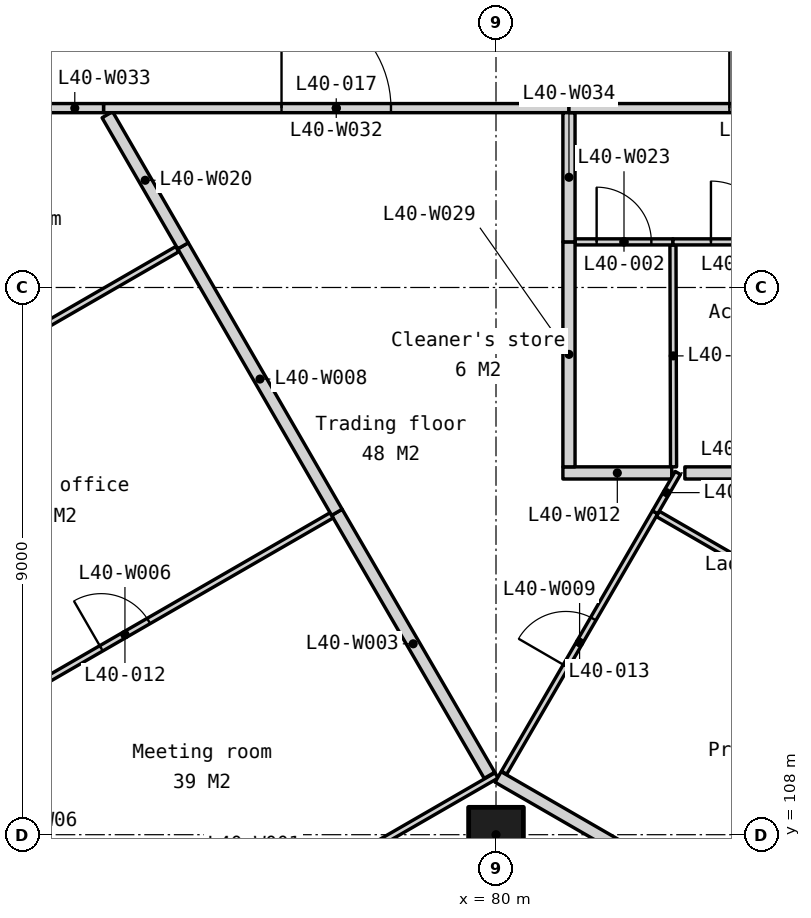
"""IFC4 building model, lengths in metres.
Left out: names, types, materials, properties, quantities, classifications, styles, units other than length and angle.
Written with IfcOpenShell. Run it as: python <this file> out.ifc"""

import sys

from ifc_helpers import new_model, si_unit, direction, frame, frame_2d, origin, origin_2d, place, context, subcontext, project, spatial, polyline, rectangle, outline, extrude, element, fill, save


model = new_model("IFC4")
c1 = context("Model", 3, precision=1e-05, world=origin(), true_north=direction((0.0, 1.0)))
c2 = subcontext(c1, "Body", "Model", "MODEL_VIEW")
j1 = project(units=[si_unit("LENGTHUNIT", "METRE"), si_unit("PLANEANGLEUNIT", "RADIAN")], contexts=[c1])
p1 = place(None, origin())
s1 = spatial("IfcSite", under=j1, at=p1, CompositionType="ELEMENT")
p2 = place(p1, origin())
s2 = spatial("IfcBuilding", under=s1, at=p2, CompositionType="ELEMENT")
p3 = place(p2, frame((0.0, 0.0, 159.8)))
s3 = spatial("IfcBuildingStorey", under=s2, at=p3, CompositionType="ELEMENT", Elevation=159.8)
p4 = place(p3, frame((80.0, 108.0, 0.0), z_axis=(0.0, 0.0, 1.0), x_axis=(1.0, 0.0, 0.0)))
e1 = element("IfcColumn", 1, at=p4, inside=s3, PredefinedType="COLUMN", context=c2, shape_type="SweptSolid", body=[
    extrude(rectangle(XDim=0.9, YDim=0.9, at=origin_2d()), origin(), (0.0, 0.0, 1.0), 3.9),
])
p5 = place(p3, frame((57.652, 131.129, -0.15), z_axis=(0.0, 0.0, 1.0), x_axis=(0.499997369791, -0.866026922331, 0.0)))
e2 = element("IfcWall", 2, at=p5, inside=s3, PredefinedType="SOLIDWALL", context=c2, shape_type="SweptSolid", body=[
    extrude(outline(polyline([(40.486, 0.0), (40.486, 3.9), (0.0, 3.9), (0.0, 0.0), (40.486, 0.0)])), frame((0.0, 0.225, 0.0), z_axis=(0.0, -1.0, 0.0), x_axis=(1.0, 0.0, 0.0)), (0.0, 0.0, 1.0), 0.45),
])
p6 = place(p5, frame((3.011, 0.0, 0.95)))
e3 = element("IfcOpeningElement", 3, at=p6, cuts=e2, PredefinedType="OPENING", context=c2, shape_type="SweptSolid", body=[
    extrude(rectangle(XDim=1.8, YDim=2.2, at=frame_2d((0.9, 1.1))), frame((0.0, 0.235, 0.0), z_axis=(0.0, -1.0, 0.0), x_axis=(1.0, 0.0, 0.0)), (0.0, 0.0, 1.0), 0.47),
])
p7 = place(p5, frame((5.311, 0.0, 0.95)))
e4 = element("IfcOpeningElement", 4, at=p7, cuts=e2, PredefinedType="OPENING", context=c2, shape_type="SweptSolid", body=[
    extrude(rectangle(XDim=1.8, YDim=2.2, at=frame_2d((0.9, 1.1))), frame((0.0, 0.235, 0.0), z_axis=(0.0, -1.0, 0.0), x_axis=(1.0, 0.0, 0.0)), (0.0, 0.0, 1.0), 0.47),
])
p8 = place(p5, frame((13.132, 0.0, 0.95)))
e5 = element("IfcOpeningElement", 5, at=p8, cuts=e2, PredefinedType="OPENING", context=c2, shape_type="SweptSolid", body=[
    extrude(rectangle(XDim=1.8, YDim=2.2, at=frame_2d((0.9, 1.1))), frame((0.0, 0.235, 0.0), z_axis=(0.0, -1.0, 0.0), x_axis=(1.0, 0.0, 0.0)), (0.0, 0.0, 1.0), 0.47),
])
p9 = place(p5, frame((15.432, 0.0, 0.95)))
e6 = element("IfcOpeningElement", 6, at=p9, cuts=e2, PredefinedType="OPENING", context=c2, shape_type="SweptSolid", body=[
    extrude(rectangle(XDim=1.8, YDim=2.2, at=frame_2d((0.9, 1.1))), frame((0.0, 0.235, 0.0), z_axis=(0.0, -1.0, 0.0), x_axis=(1.0, 0.0, 0.0)), (0.0, 0.0, 1.0), 0.47),
])
p10 = place(p5, frame((23.254, 0.0, 0.95)))
e7 = element("IfcOpeningElement", 7, at=p10, cuts=e2, PredefinedType="OPENING", context=c2, shape_type="SweptSolid", body=[
    extrude(rectangle(XDim=1.8, YDim=2.2, at=frame_2d((0.9, 1.1))), frame((0.0, 0.235, 0.0), z_axis=(0.0, -1.0, 0.0), x_axis=(1.0, 0.0, 0.0)), (0.0, 0.0, 1.0), 0.47),
])
p11 = place(p5, frame((25.554, 0.0, 0.95)))
e8 = element("IfcOpeningElement", 8, at=p11, cuts=e2, PredefinedType="OPENING", context=c2, shape_type="SweptSolid", body=[
    extrude(rectangle(XDim=1.8, YDim=2.2, at=frame_2d((0.9, 1.1))), frame((0.0, 0.235, 0.0), z_axis=(0.0, -1.0, 0.0), x_axis=(1.0, 0.0, 0.0)), (0.0, 0.0, 1.0), 0.47),
])
p12 = place(p5, frame((33.375, 0.0, 0.95)))
e9 = element("IfcOpeningElement", 9, at=p12, cuts=e2, PredefinedType="OPENING", context=c2, shape_type="SweptSolid", body=[
    extrude(rectangle(XDim=1.8, YDim=2.2, at=frame_2d((0.9, 1.1))), frame((0.0, 0.235, 0.0), z_axis=(0.0, -1.0, 0.0), x_axis=(1.0, 0.0, 0.0)), (0.0, 0.0, 1.0), 0.47),
])
p13 = place(p5, frame((35.675, 0.0, 0.95)))
e10 = element("IfcOpeningElement", 10, at=p13, cuts=e2, PredefinedType="OPENING", context=c2, shape_type="SweptSolid", body=[
    extrude(rectangle(XDim=1.8, YDim=2.2, at=frame_2d((0.9, 1.1))), frame((0.0, 0.235, 0.0), z_axis=(0.0, -1.0, 0.0), x_axis=(1.0, 0.0, 0.0)), (0.0, 0.0, 1.0), 0.47),
])
p14 = place(p3, frame((82.105, 96.067, -0.15), z_axis=(0.0, 0.0, 1.0), x_axis=(0.499997369791, 0.866026922331, 0.0)))
e11 = element("IfcWall", 11, at=p14, inside=s3, PredefinedType="SOLIDWALL", context=c2, shape_type="SweptSolid", body=[
    extrude(outline(polyline([(40.486, 0.0), (40.486, 3.9), (0.0, 3.9), (0.0, 0.0), (40.486, 0.0)])), frame((0.0, 0.225, 0.0), z_axis=(0.0, -1.0, 0.0), x_axis=(1.0, 0.0, 0.0)), (0.0, 0.0, 1.0), 0.45),
])
p15 = place(p14, frame((3.011, 0.0, 0.95)))
e12 = element("IfcOpeningElement", 12, at=p15, cuts=e11, PredefinedType="OPENING", context=c2, shape_type="SweptSolid", body=[
    extrude(rectangle(XDim=1.8, YDim=2.2, at=frame_2d((0.9, 1.1))), frame((0.0, 0.235, 0.0), z_axis=(0.0, -1.0, 0.0), x_axis=(1.0, 0.0, 0.0)), (0.0, 0.0, 1.0), 0.47),
])
p16 = place(p14, frame((5.311, 0.0, 0.95)))
e13 = element("IfcOpeningElement", 13, at=p16, cuts=e11, PredefinedType="OPENING", context=c2, shape_type="SweptSolid", body=[
    extrude(rectangle(XDim=1.8, YDim=2.2, at=frame_2d((0.9, 1.1))), frame((0.0, 0.235, 0.0), z_axis=(0.0, -1.0, 0.0), x_axis=(1.0, 0.0, 0.0)), (0.0, 0.0, 1.0), 0.47),
])
p17 = place(p14, frame((13.132, 0.0, 0.95)))
e14 = element("IfcOpeningElement", 14, at=p17, cuts=e11, PredefinedType="OPENING", context=c2, shape_type="SweptSolid", body=[
    extrude(rectangle(XDim=1.8, YDim=2.2, at=frame_2d((0.9, 1.1))), frame((0.0, 0.235, 0.0), z_axis=(0.0, -1.0, 0.0), x_axis=(1.0, 0.0, 0.0)), (0.0, 0.0, 1.0), 0.47),
])
p18 = place(p14, frame((15.432, 0.0, 0.95)))
e15 = element("IfcOpeningElement", 15, at=p18, cuts=e11, PredefinedType="OPENING", context=c2, shape_type="SweptSolid", body=[
    extrude(rectangle(XDim=1.8, YDim=2.2, at=frame_2d((0.9, 1.1))), frame((0.0, 0.235, 0.0), z_axis=(0.0, -1.0, 0.0), x_axis=(1.0, 0.0, 0.0)), (0.0, 0.0, 1.0), 0.47),
])
p19 = place(p14, frame((23.254, 0.0, 0.95)))
e16 = element("IfcOpeningElement", 16, at=p19, cuts=e11, PredefinedType="OPENING", context=c2, shape_type="SweptSolid", body=[
    extrude(rectangle(XDim=1.8, YDim=2.2, at=frame_2d((0.9, 1.1))), frame((0.0, 0.235, 0.0), z_axis=(0.0, -1.0, 0.0), x_axis=(1.0, 0.0, 0.0)), (0.0, 0.0, 1.0), 0.47),
])
p20 = place(p14, frame((25.554, 0.0, 0.95)))
e17 = element("IfcOpeningElement", 17, at=p20, cuts=e11, PredefinedType="OPENING", context=c2, shape_type="SweptSolid", body=[
    extrude(rectangle(XDim=1.8, YDim=2.2, at=frame_2d((0.9, 1.1))), frame((0.0, 0.235, 0.0), z_axis=(0.0, -1.0, 0.0), x_axis=(1.0, 0.0, 0.0)), (0.0, 0.0, 1.0), 0.47),
])
p21 = place(p14, frame((33.375, 0.0, 0.95)))
e18 = element("IfcOpeningElement", 18, at=p21, cuts=e11, PredefinedType="OPENING", context=c2, shape_type="SweptSolid", body=[
    extrude(rectangle(XDim=1.8, YDim=2.2, at=frame_2d((0.9, 1.1))), frame((0.0, 0.235, 0.0), z_axis=(0.0, -1.0, 0.0), x_axis=(1.0, 0.0, 0.0)), (0.0, 0.0, 1.0), 0.47),
])
p22 = place(p14, frame((35.675, 0.0, 0.95)))
e19 = element("IfcOpeningElement", 19, at=p22, cuts=e11, PredefinedType="OPENING", context=c2, shape_type="SweptSolid", body=[
    extrude(rectangle(XDim=1.8, YDim=2.2, at=frame_2d((0.9, 1.1))), frame((0.0, 0.235, 0.0), z_axis=(0.0, -1.0, 0.0), x_axis=(1.0, 0.0, 0.0)), (0.0, 0.0, 1.0), 0.47),
])
p23 = place(p3, frame((73.029, 104.945, 0.0), z_axis=(0.0, 0.0, 1.0), x_axis=(0.866018113567, 0.500012626815, 0.0)))
e20 = element("IfcWall", 20, at=p23, inside=s3, PredefinedType="PARTITIONING", context=c2, shape_type="SweptSolid", body=[
    extrude(rectangle(XDim=8.06, YDim=0.1, at=frame_2d((4.03, 0.0))), origin(), (0.0, 0.0, 1.0), 3.75),
])
p24 = place(p23, frame((3.58, 0.0, 0.0)))
e21 = element("IfcOpeningElement", 21, at=p24, cuts=e20, PredefinedType="OPENING", context=c2, shape_type="SweptSolid", body=[
    extrude(rectangle(XDim=0.9, YDim=2.1, at=frame_2d((0.45, 1.05))), frame((0.0, 0.06, 0.0), z_axis=(0.0, -1.0, 0.0), x_axis=(1.0, 0.0, 0.0)), (0.0, 0.0, 1.0), 0.12),
])
p25 = place(p3, frame((77.384, 113.302, 0.0), z_axis=(0.0, 0.0, 1.0), x_axis=(0.501680827225, -0.865052800467, 0.0)))
e22 = element("IfcWall", 22, at=p25, inside=s3, PredefinedType="PARTITIONING", context=c2, shape_type="SweptSolid", body=[
    extrude(rectangle(XDim=5.001, YDim=0.2, at=frame_2d((2.5, 0.0))), origin(), (0.0, 0.0, 1.0), 3.75),
])
p26 = place(p3, frame((80.034, 108.95, 0.0), z_axis=(0.0, 0.0, 1.0), x_axis=(0.866028745538, -0.499994211868, 0.0)))
e23 = element("IfcWall", 23, at=p26, inside=s3, PredefinedType="PARTITIONING", context=c2, shape_type="SweptSolid", body=[
    extrude(rectangle(XDim=8.01, YDim=0.2, at=frame_2d((4.005, 0.0))), origin(), (0.0, 0.0, 1.0), 3.75),
])
p27 = place(p3, frame((70.499, 109.327, 0.0), z_axis=(0.0, 0.0, 1.0), x_axis=(0.86602399778, 0.500002435262, 0.0)))
e24 = element("IfcWall", 24, at=p27, inside=s3, PredefinedType="PARTITIONING", context=c2, shape_type="SweptSolid", body=[
    extrude(rectangle(XDim=7.85, YDim=0.1, at=frame_2d((3.925, 0.0))), origin(), (0.0, 0.0, 1.0), 3.75),
])
p28 = place(p27, frame((3.475, 0.0, 0.0)))
e25 = element("IfcOpeningElement", 25, at=p28, cuts=e24, PredefinedType="OPENING", context=c2, shape_type="SweptSolid", body=[
    extrude(rectangle(XDim=0.9, YDim=2.1, at=frame_2d((0.45, 1.05))), frame((0.0, 0.06, 0.0), z_axis=(0.0, -1.0, 0.0), x_axis=(1.0, 0.0, 0.0)), (0.0, 0.0, 1.0), 0.12),
])
p29 = place(p3, frame((82.66, 113.278, 0.0), z_axis=(0.0, 0.0, 1.0), x_axis=(0.866013180616, -0.500021170551, 0.0)))
e26 = element("IfcWall", 26, at=p29, inside=s3, PredefinedType="PARTITIONING", context=c2, shape_type="SweptSolid", body=[
    extrude(rectangle(XDim=7.9, YDim=0.1, at=frame_2d((3.95, 0.0))), origin(), (0.0, 0.0, 1.0), 3.75),
])
p30 = place(p29, frame((3.5, 0.0, 0.0)))
e27 = element("IfcOpeningElement", 27, at=p30, cuts=e26, PredefinedType="OPENING", context=c2, shape_type="SweptSolid", body=[
    extrude(rectangle(XDim=0.9, YDim=2.1, at=frame_2d((0.45, 1.05))), frame((0.0, 0.06, 0.0), z_axis=(0.0, -1.0, 0.0), x_axis=(1.0, 0.0, 0.0)), (0.0, 0.0, 1.0), 0.12),
])
p31 = place(p3, frame((74.853, 117.685, 0.0), z_axis=(0.0, 0.0, 1.0), x_axis=(0.500014760403, -0.866016881694, 0.0)))
e28 = element("IfcWall", 28, at=p31, inside=s3, PredefinedType="PARTITIONING", context=c2, shape_type="SweptSolid", body=[
    extrude(rectangle(XDim=5.061, YDim=0.2, at=frame_2d((2.53, 0.0))), origin(), (0.0, 0.0, 1.0), 3.75),
])
p32 = place(p3, frame((80.133, 109.02, 0.0), z_axis=(0.0, 0.0, 1.0), x_axis=(0.501726207978, 0.865026480651, 0.0)))
e29 = element("IfcWall", 29, at=p32, inside=s3, PredefinedType="PARTITIONING", context=c2, shape_type="SweptSolid", body=[
    extrude(rectangle(XDim=4.951, YDim=0.1, at=frame_2d((2.475, 0.0))), origin(), (0.0, 0.0, 1.0), 3.75),
])
p33 = place(p32, frame((2.025, 0.0, 0.0)))
e30 = element("IfcOpeningElement", 30, at=p33, cuts=e29, PredefinedType="OPENING", context=c2, shape_type="SweptSolid", body=[
    extrude(rectangle(XDim=0.9, YDim=2.1, at=frame_2d((0.45, 1.05))), frame((0.0, 0.06, 0.0), z_axis=(0.0, -1.0, 0.0), x_axis=(1.0, 0.0, 0.0)), (0.0, 0.0, 1.0), 0.12),
])
p34 = place(p3, frame((67.968, 113.71, 0.0), z_axis=(0.0, 0.0, 1.0), x_axis=(0.866013415921, 0.500020763015, 0.0)))
e31 = element("IfcWall", 31, at=p34, inside=s3, PredefinedType="PARTITIONING", context=c2, shape_type="SweptSolid", body=[
    extrude(rectangle(XDim=7.84, YDim=0.1, at=frame_2d((3.92, 0.0))), origin(), (0.0, 0.0, 1.0), 3.75),
])
p35 = place(p34, frame((3.47, 0.0, 0.0)))
e32 = element("IfcOpeningElement", 32, at=p35, cuts=e31, PredefinedType="OPENING", context=c2, shape_type="SweptSolid", body=[
    extrude(rectangle(XDim=0.9, YDim=2.1, at=frame_2d((0.45, 1.05))), frame((0.0, 0.06, 0.0), z_axis=(0.0, -1.0, 0.0), x_axis=(1.0, 0.0, 0.0)), (0.0, 0.0, 1.0), 0.12),
])
p36 = place(p3, frame((81.1, 113.95, 0.0), z_axis=(0.0, 0.0, 1.0), x_axis=(1.0, 0.0, 0.0)))
e33 = element("IfcWall", 33, at=p36, inside=s3, PredefinedType="PARTITIONING", context=c2, shape_type="SweptSolid", body=[
    extrude(rectangle(XDim=1.79, YDim=0.2, at=frame_2d((0.895, 0.0))), origin(), (0.0, 0.0, 1.0), 3.75),
])
p37 = place(p3, frame((82.616, 113.302, 0.0), z_axis=(0.0, 0.0, 1.0), x_axis=(0.500212318761, 0.865902786784, 0.0)))
e34 = element("IfcWall", 34, at=p37, inside=s3, PredefinedType="PARTITIONING", context=c2, shape_type="SweptSolid", body=[
    extrude(rectangle(XDim=0.748, YDim=0.1, at=frame_2d((0.374, 0.0))), origin(), (0.0, 0.0, 1.0), 3.75),
])
p38 = place(p3, frame((83.106, 113.95, 0.0), z_axis=(0.0, 0.0, 1.0), x_axis=(1.0, 0.0, 0.0)))
e35 = element("IfcWall", 35, at=p38, inside=s3, PredefinedType="PARTITIONING", context=c2, shape_type="SweptSolid", body=[
    extrude(rectangle(XDim=2.044, YDim=0.2, at=frame_2d((1.022, 0.0))), origin(), (0.0, 0.0, 1.0), 3.75),
])
p39 = place(p3, frame((73.608, 119.842, 0.0), z_axis=(0.0, 0.0, 1.0), x_axis=(0.50001949124, -0.86601415022, 0.0)))
e36 = element("IfcWall", 36, at=p39, inside=s3, PredefinedType="PARTITIONING", context=c2, shape_type="SweptSolid", body=[
    extrude(rectangle(XDim=2.49, YDim=0.2, at=frame_2d((1.245, 0.0))), origin(), (0.0, 0.0, 1.0), 3.75),
])
p40 = place(p3, frame((82.92, 114.05, 0.0), z_axis=(0.0, 0.0, 1.0), x_axis=(-0.002608686776, 0.999996597371, 0.0)))
e37 = element("IfcWall", 37, at=p40, inside=s3, PredefinedType="PARTITIONING", context=c2, shape_type="SweptSolid", body=[
    extrude(rectangle(XDim=3.65, YDim=0.1, at=frame_2d((1.825, 0.0))), origin(), (0.0, 0.0, 1.0), 3.75),
])
p41 = place(p3, frame((81.3, 117.75, 0.0), z_axis=(0.0, 0.0, 1.0), x_axis=(1.0, 0.0, 0.0)))
e38 = element("IfcWall", 38, at=p41, inside=s3, PredefinedType="PARTITIONING", context=c2, shape_type="SweptSolid", body=[
    extrude(rectangle(XDim=1.61, YDim=0.1, at=frame_2d((0.805, 0.0))), origin(), (0.0, 0.0, 1.0), 3.75),
])
p42 = place(p41, frame((0.355, 0.0, 0.0)))
e39 = element("IfcOpeningElement", 39, at=p42, cuts=e38, PredefinedType="OPENING", context=c2, shape_type="SweptSolid", body=[
    extrude(rectangle(XDim=0.9, YDim=2.1, at=frame_2d((0.45, 1.05))), frame((0.0, 0.06, 0.0), z_axis=(0.0, -1.0, 0.0), x_axis=(1.0, 0.0, 0.0)), (0.0, 0.0, 1.0), 0.12),
])
p43 = place(p3, frame((82.91, 117.75, 0.0), z_axis=(0.0, 0.0, 1.0), x_axis=(1.0, 0.0, 0.0)))
e40 = element("IfcWall", 40, at=p43, inside=s3, PredefinedType="PARTITIONING", context=c2, shape_type="SweptSolid", body=[
    extrude(rectangle(XDim=2.25, YDim=0.1, at=frame_2d((1.125, 0.0))), origin(), (0.0, 0.0, 1.0), 3.75),
])
p44 = place(p43, frame((0.625, 0.0, 0.0)))
e41 = element("IfcOpeningElement", 41, at=p44, cuts=e40, PredefinedType="OPENING", context=c2, shape_type="SweptSolid", body=[
    extrude(rectangle(XDim=1.0, YDim=2.1, at=frame_2d((0.5, 1.05))), frame((0.0, 0.06, 0.0), z_axis=(0.0, -1.0, 0.0), x_axis=(1.0, 0.0, 0.0)), (0.0, 0.0, 1.0), 0.12),
])
p45 = place(p3, frame((81.2, 114.05, 0.0), z_axis=(0.0, 0.0, 1.0), x_axis=(0.0, 1.0, 0.0)))
e42 = element("IfcWall", 42, at=p45, inside=s3, PredefinedType="PARTITIONING", context=c2, shape_type="SweptSolid", body=[
    extrude(rectangle(XDim=3.7, YDim=0.2, at=frame_2d((1.85, 0.0))), origin(), (0.0, 0.0, 1.0), 3.75),
])
p46 = place(p3, frame((73.545, 119.95, 0.0), z_axis=(0.0, 0.0, 1.0), x_axis=(1.0, 0.0, 0.0)))
e43 = element("IfcWall", 43, at=p46, inside=s3, PredefinedType="PARTITIONING", context=c2, shape_type="SweptSolid", body=[
    extrude(rectangle(XDim=7.655, YDim=0.15, at=frame_2d((3.827, 0.0))), origin(), (0.0, 0.0, 1.0), 3.75),
])
p47 = place(p46, frame((2.927, 0.0, 0.0)))
e44 = element("IfcOpeningElement", 44, at=p47, cuts=e43, PredefinedType="OPENING", context=c2, shape_type="SweptSolid", body=[
    extrude(rectangle(XDim=1.8, YDim=2.1, at=frame_2d((0.9, 1.05))), frame((0.0, 0.085, 0.0), z_axis=(0.0, -1.0, 0.0), x_axis=(1.0, 0.0, 0.0)), (0.0, 0.0, 1.0), 0.17),
])
p48 = place(p3, frame((72.6, 119.95, 0.0), z_axis=(0.0, 0.0, 1.0), x_axis=(1.0, 0.0, 0.0)))
e45 = element("IfcWall", 45, at=p48, inside=s3, PredefinedType="PARTITIONING", context=c2, shape_type="SweptSolid", body=[
    extrude(rectangle(XDim=0.945, YDim=0.15, at=frame_2d((0.473, 0.0))), origin(), (0.0, 0.0, 1.0), 3.75),
])
p49 = place(p3, frame((81.2, 117.75, 0.0), z_axis=(0.0, 0.0, 1.0), x_axis=(0.0, 1.0, 0.0)))
e46 = element("IfcWall", 46, at=p49, inside=s3, PredefinedType="PARTITIONING", context=c2, shape_type="SweptSolid", body=[
    extrude(rectangle(XDim=2.125, YDim=0.2, at=frame_2d((1.062, 0.0))), origin(), (0.0, 0.0, 1.0), 3.75),
])
p50 = place(p3, frame((81.2, 119.95, 0.0), z_axis=(0.0, 0.0, 1.0), x_axis=(1.0, 0.0, 0.0)))
e47 = element("IfcWall", 47, at=p50, inside=s3, PredefinedType="PARTITIONING", context=c2, shape_type="SweptSolid", body=[
    extrude(rectangle(XDim=6.275, YDim=0.15, at=frame_2d((3.138, 0.0))), origin(), (0.0, 0.0, 1.0), 3.75),
])
p51 = place(p50, frame((2.637, 0.0, 0.0)))
e48 = element("IfcOpeningElement", 48, at=p51, cuts=e47, PredefinedType="OPENING", context=c2, shape_type="SweptSolid", body=[
    extrude(rectangle(XDim=1.0, YDim=2.1, at=frame_2d((0.5, 1.05))), frame((0.0, 0.085, 0.0), z_axis=(0.0, -1.0, 0.0), x_axis=(1.0, 0.0, 0.0)), (0.0, 0.0, 1.0), 0.17),
])
p52 = place(p51, origin())
e49 = element("IfcDoor", 49, at=p52, inside=s3, OperationType="SINGLE_SWING_LEFT", PredefinedType="DOOR", context=c2, shape_type="SweptSolid", body=[
    extrude(rectangle(XDim=1.0, YDim=2.1, at=frame_2d((0.5, 1.05))), frame((0.0, 0.025, 0.0), z_axis=(0.0, -1.0, 0.0), x_axis=(1.0, 0.0, 0.0)), (0.0, 0.0, 1.0), 0.05),
])
fill(e48, e49)
p53 = place(p42, origin())
e50 = element("IfcDoor", 50, at=p53, inside=s3, OperationType="SINGLE_SWING_LEFT", PredefinedType="DOOR", context=c2, shape_type="SweptSolid", body=[
    extrude(rectangle(XDim=0.9, YDim=2.1, at=frame_2d((0.45, 1.05))), frame((0.0, 0.025, 0.0), z_axis=(0.0, -1.0, 0.0), x_axis=(1.0, 0.0, 0.0)), (0.0, 0.0, 1.0), 0.05),
])
fill(e39, e50)
p54 = place(p44, origin())
e51 = element("IfcDoor", 51, at=p54, inside=s3, OperationType="SINGLE_SWING_LEFT", PredefinedType="DOOR", context=c2, shape_type="SweptSolid", body=[
    extrude(rectangle(XDim=1.0, YDim=2.1, at=frame_2d((0.5, 1.05))), frame((0.0, 0.025, 0.0), z_axis=(0.0, -1.0, 0.0), x_axis=(1.0, 0.0, 0.0)), (0.0, 0.0, 1.0), 0.05),
])
fill(e41, e51)
p55 = place(p28, origin())
e52 = element("IfcDoor", 52, at=p55, inside=s3, OperationType="SINGLE_SWING_LEFT", PredefinedType="DOOR", context=c2, shape_type="SweptSolid", body=[
    extrude(rectangle(XDim=0.9, YDim=2.1, at=frame_2d((0.45, 1.05))), frame((0.0, 0.025, 0.0), z_axis=(0.0, -1.0, 0.0), x_axis=(1.0, 0.0, 0.0)), (0.0, 0.0, 1.0), 0.05),
])
fill(e25, e52)
p56 = place(p33, origin())
e53 = element("IfcDoor", 53, at=p56, inside=s3, OperationType="SINGLE_SWING_LEFT", PredefinedType="DOOR", context=c2, shape_type="SweptSolid", body=[
    extrude(rectangle(XDim=0.9, YDim=2.1, at=frame_2d((0.45, 1.05))), frame((0.0, 0.025, 0.0), z_axis=(0.0, -1.0, 0.0), x_axis=(1.0, 0.0, 0.0)), (0.0, 0.0, 1.0), 0.05),
])
fill(e30, e53)
p57 = place(p47, origin())
e54 = element("IfcDoor", 54, at=p57, inside=s3, OperationType="SINGLE_SWING_LEFT", PredefinedType="DOOR", context=c2, shape_type="SweptSolid", body=[
    extrude(rectangle(XDim=1.8, YDim=2.1, at=frame_2d((0.9, 1.05))), frame((0.0, 0.025, 0.0), z_axis=(0.0, -1.0, 0.0), x_axis=(1.0, 0.0, 0.0)), (0.0, 0.0, 1.0), 0.05),
])
fill(e44, e54)
save(model, sys.argv[1])
